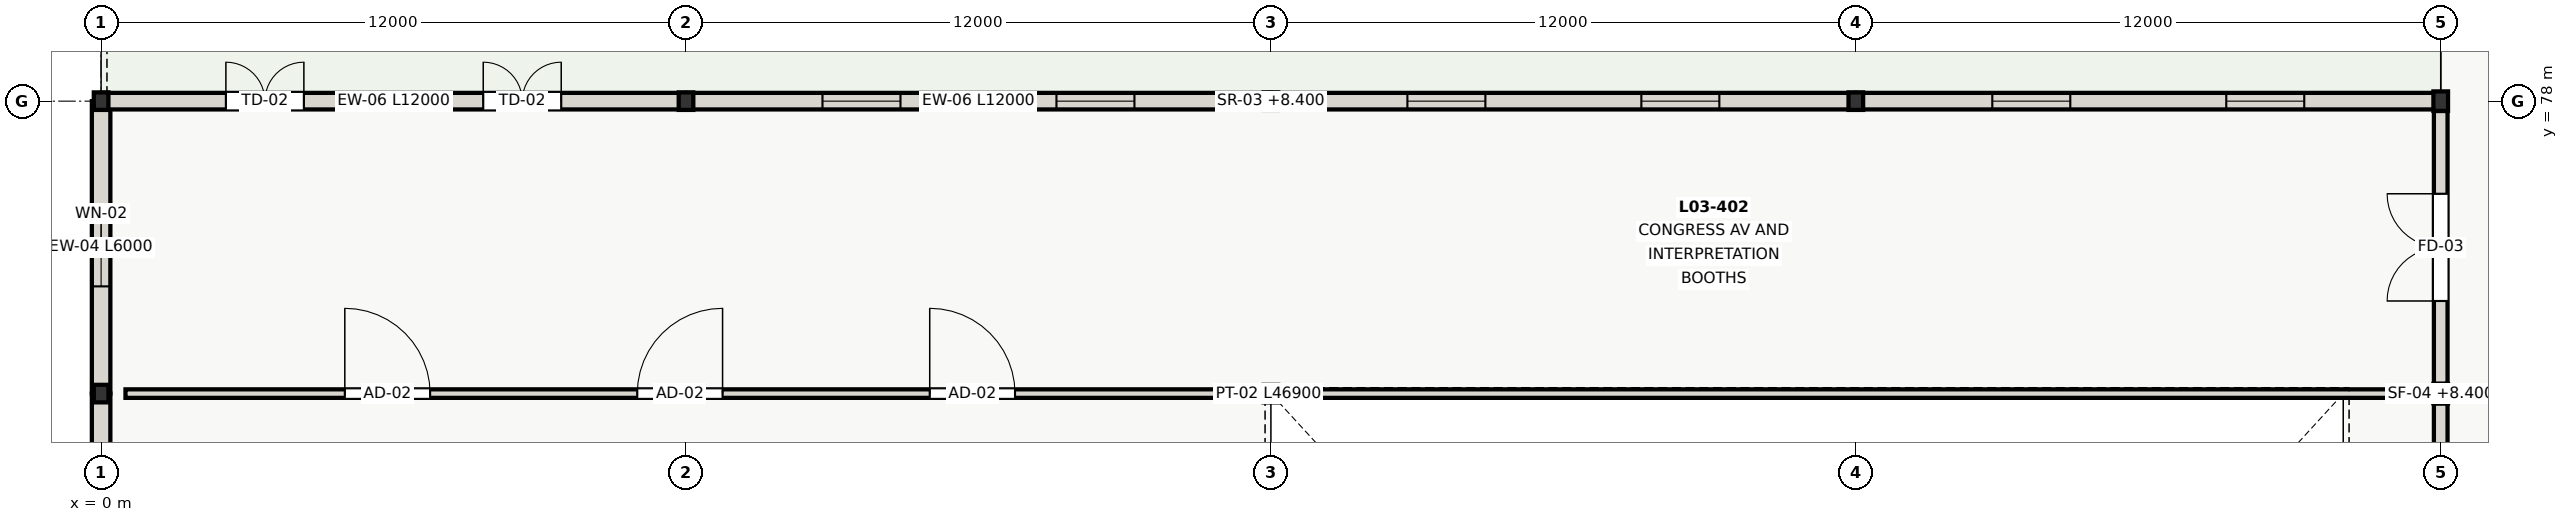
"""IFC4 building model, lengths in metres.
Left out: names, types, materials, properties, quantities, classifications, styles, units other than length and angle.
Written with IfcOpenShell. Run it as: python <this file> out.ifc"""

import sys

from ifc_helpers import new_model, si_unit, direction, frame, frame_2d, origin, origin_2d, place, context, subcontext, project, spatial, rectangle, i_section, extrude, element, fill, save


model = new_model("IFC4")
c1 = context("Model", 3, precision=1e-05, world=origin(), true_north=direction((0.0, 1.0)))
c2 = subcontext(c1, "Body", "Model", "MODEL_VIEW")
j1 = project(units=[si_unit("LENGTHUNIT", "METRE"), si_unit("PLANEANGLEUNIT", "RADIAN")], contexts=[c1])
p1 = place(None, origin())
s1 = spatial("IfcSite", under=j1, at=p1, CompositionType="ELEMENT")
p2 = place(p1, origin())
s2 = spatial("IfcBuilding", under=s1, at=p2, CompositionType="ELEMENT")
p3 = place(p2, frame((0.0, 0.0, 8.4)))
s3 = spatial("IfcBuildingStorey", under=s2, at=p3, CompositionType="ELEMENT", Elevation=8.4)
for number, where, z_axis, x_axis in (
    (1, (0.0, 72.0, 0.0), (0.0, 0.0, 1.0), (1.0, 0.0, 0.0)),
    (2, (24.0, 72.0, 0.0), (0.0, 0.0, 1.0), (1.0, 0.0, 0.0)),
):
    element("IfcColumn", number, at=place(p3, frame(where, z_axis=z_axis, x_axis=x_axis)), inside=s3, PredefinedType="COLUMN", context=c2, shape_type="SweptSolid", body=[
        extrude(i_section(OverallWidth=0.3, OverallDepth=0.36, WebThickness=0.012, FlangeThickness=0.022, at=origin_2d()), origin(), (0.0, 0.0, 1.0), 4.2),
    ])
p4 = place(p3, frame((48.0, 72.0, 0.0), z_axis=(0.0, 0.0, 1.0), x_axis=(1.0, 0.0, 0.0)))
e3 = element("IfcColumn", 3, at=p4, inside=s3, PredefinedType="COLUMN", context=c2, shape_type="SweptSolid", body=[
    extrude(i_section(OverallWidth=0.3, OverallDepth=0.4, WebThickness=0.013, FlangeThickness=0.024, at=origin_2d()), origin(), (0.0, 0.0, 1.0), 4.2),
])
for number, where, z_axis, x_axis in (
    (4, (0.0, 78.0, 0.0), (0.0, 0.0, 1.0), (1.0, 0.0, 0.0)),
    (5, (12.0, 78.0, 0.0), (0.0, 0.0, 1.0), (1.0, 0.0, 0.0)),
    (6, (24.0, 78.0, 0.0), (0.0, 0.0, 1.0), (1.0, 0.0, 0.0)),
    (7, (36.0, 78.0, 0.0), (0.0, 0.0, 1.0), (1.0, 0.0, 0.0)),
):
    element("IfcColumn", number, at=place(p3, frame(where, z_axis=z_axis, x_axis=x_axis)), inside=s3, PredefinedType="COLUMN", context=c2, shape_type="SweptSolid", body=[
        extrude(i_section(OverallWidth=0.3, OverallDepth=0.36, WebThickness=0.012, FlangeThickness=0.022, at=origin_2d()), origin(), (0.0, 0.0, 1.0), 4.2),
    ])
p5 = place(p3, frame((48.0, 78.0, 0.0), z_axis=(0.0, 0.0, 1.0), x_axis=(1.0, 0.0, 0.0)))
e8 = element("IfcColumn", 8, at=p5, inside=s3, PredefinedType="COLUMN", context=c2, shape_type="SweptSolid", body=[
    extrude(i_section(OverallWidth=0.3, OverallDepth=0.4, WebThickness=0.013, FlangeThickness=0.024, at=origin_2d()), origin(), (0.0, 0.0, 1.0), 4.2),
])
p6 = place(p3, frame((0.0, 67.6, 0.0), z_axis=(0.0, 0.0, 1.0), x_axis=(0.0, 1.0, 0.0)))
e9 = element("IfcWall", 9, at=p6, inside=s3, PredefinedType="SOLIDWALL", context=c2, shape_type="SweptSolid", body=[
    extrude(rectangle(XDim=4.4, YDim=0.38, at=frame_2d((2.2, 0.0))), origin(), (0.0, 0.0, 1.0), 4.2),
])
p7 = place(p6, frame((1.4, 0.0, 0.9)))
e10 = element("IfcOpeningElement", 10, at=p7, cuts=e9, PredefinedType="OPENING", context=c2, shape_type="SweptSolid", body=[
    extrude(rectangle(XDim=1.6, YDim=2.0, at=frame_2d((0.8, 1.0))), frame((0.0, 0.2, 0.0), z_axis=(0.0, -1.0, 0.0), x_axis=(1.0, 0.0, 0.0)), (0.0, 0.0, 1.0), 0.4),
])
p8 = place(p3, frame((0.0, 72.0, 0.0), z_axis=(0.0, 0.0, 1.0), x_axis=(0.0, 1.0, 0.0)))
e11 = element("IfcWall", 11, at=p8, inside=s3, PredefinedType="SOLIDWALL", context=c2, shape_type="SweptSolid", body=[
    extrude(rectangle(XDim=6.0, YDim=0.38, at=frame_2d((3.0, 0.0))), origin(), (0.0, 0.0, 1.0), 4.2),
])
p9 = place(p8, frame((2.2, 0.0, 0.9)))
e12 = element("IfcOpeningElement", 12, at=p9, cuts=e11, PredefinedType="OPENING", context=c2, shape_type="SweptSolid", body=[
    extrude(rectangle(XDim=1.6, YDim=2.0, at=frame_2d((0.8, 1.0))), frame((0.0, 0.2, 0.0), z_axis=(0.0, -1.0, 0.0), x_axis=(1.0, 0.0, 0.0)), (0.0, 0.0, 1.0), 0.4),
])
p10 = place(p3, frame((0.0, 78.0, 0.0), z_axis=(0.0, 0.0, 1.0), x_axis=(1.0, 0.0, 0.0)))
e13 = element("IfcWall", 13, at=p10, inside=s3, PredefinedType="SOLIDWALL", context=c2, shape_type="SweptSolid", body=[
    extrude(rectangle(XDim=12.0, YDim=0.34, at=frame_2d((6.0, 0.0))), origin(), (0.0, 0.0, 1.0), 4.2),
])
p11 = place(p10, frame((2.56, 0.0, 0.0)))
e14 = element("IfcOpeningElement", 14, at=p11, cuts=e13, PredefinedType="OPENING", context=c2, shape_type="SweptSolid", body=[
    extrude(rectangle(XDim=1.6, YDim=2.15, at=frame_2d((0.8, 1.075))), frame((0.0, 0.18, 0.0), z_axis=(0.0, -1.0, 0.0), x_axis=(1.0, 0.0, 0.0)), (0.0, 0.0, 1.0), 0.36),
])
p12 = place(p10, frame((7.84, 0.0, 0.0)))
e15 = element("IfcOpeningElement", 15, at=p12, cuts=e13, PredefinedType="OPENING", context=c2, shape_type="SweptSolid", body=[
    extrude(rectangle(XDim=1.6, YDim=2.15, at=frame_2d((0.8, 1.075))), frame((0.0, 0.18, 0.0), z_axis=(0.0, -1.0, 0.0), x_axis=(1.0, 0.0, 0.0)), (0.0, 0.0, 1.0), 0.36),
])
p13 = place(p3, frame((12.0, 78.0, 0.0), z_axis=(0.0, 0.0, 1.0), x_axis=(1.0, 0.0, 0.0)))
e16 = element("IfcWall", 16, at=p13, inside=s3, PredefinedType="SOLIDWALL", context=c2, shape_type="SweptSolid", body=[
    extrude(rectangle(XDim=12.0, YDim=0.34, at=frame_2d((6.0, 0.0))), origin(), (0.0, 0.0, 1.0), 4.2),
])
p14 = place(p13, frame((2.8, 0.0, 0.9)))
e17 = element("IfcOpeningElement", 17, at=p14, cuts=e16, PredefinedType="OPENING", context=c2, shape_type="SweptSolid", body=[
    extrude(rectangle(XDim=1.6, YDim=2.0, at=frame_2d((0.8, 1.0))), frame((0.0, 0.18, 0.0), z_axis=(0.0, -1.0, 0.0), x_axis=(1.0, 0.0, 0.0)), (0.0, 0.0, 1.0), 0.36),
])
p15 = place(p13, frame((7.6, 0.0, 0.9)))
e18 = element("IfcOpeningElement", 18, at=p15, cuts=e16, PredefinedType="OPENING", context=c2, shape_type="SweptSolid", body=[
    extrude(rectangle(XDim=1.6, YDim=2.0, at=frame_2d((0.8, 1.0))), frame((0.0, 0.18, 0.0), z_axis=(0.0, -1.0, 0.0), x_axis=(1.0, 0.0, 0.0)), (0.0, 0.0, 1.0), 0.36),
])
p16 = place(p3, frame((24.0, 78.0, 0.0), z_axis=(0.0, 0.0, 1.0), x_axis=(1.0, 0.0, 0.0)))
e19 = element("IfcWall", 19, at=p16, inside=s3, PredefinedType="SOLIDWALL", context=c2, shape_type="SweptSolid", body=[
    extrude(rectangle(XDim=12.0, YDim=0.34, at=frame_2d((6.0, 0.0))), origin(), (0.0, 0.0, 1.0), 4.2),
])
p17 = place(p16, frame((2.8, 0.0, 0.9)))
e20 = element("IfcOpeningElement", 20, at=p17, cuts=e19, PredefinedType="OPENING", context=c2, shape_type="SweptSolid", body=[
    extrude(rectangle(XDim=1.6, YDim=2.0, at=frame_2d((0.8, 1.0))), frame((0.0, 0.18, 0.0), z_axis=(0.0, -1.0, 0.0), x_axis=(1.0, 0.0, 0.0)), (0.0, 0.0, 1.0), 0.36),
])
p18 = place(p16, frame((7.6, 0.0, 0.9)))
e21 = element("IfcOpeningElement", 21, at=p18, cuts=e19, PredefinedType="OPENING", context=c2, shape_type="SweptSolid", body=[
    extrude(rectangle(XDim=1.6, YDim=2.0, at=frame_2d((0.8, 1.0))), frame((0.0, 0.18, 0.0), z_axis=(0.0, -1.0, 0.0), x_axis=(1.0, 0.0, 0.0)), (0.0, 0.0, 1.0), 0.36),
])
p19 = place(p3, frame((36.0, 78.0, 0.0), z_axis=(0.0, 0.0, 1.0), x_axis=(1.0, 0.0, 0.0)))
e22 = element("IfcWall", 22, at=p19, inside=s3, PredefinedType="SOLIDWALL", context=c2, shape_type="SweptSolid", body=[
    extrude(rectangle(XDim=12.0, YDim=0.34, at=frame_2d((6.0, 0.0))), origin(), (0.0, 0.0, 1.0), 4.2),
])
p20 = place(p19, frame((2.8, 0.0, 0.9)))
e23 = element("IfcOpeningElement", 23, at=p20, cuts=e22, PredefinedType="OPENING", context=c2, shape_type="SweptSolid", body=[
    extrude(rectangle(XDim=1.6, YDim=2.0, at=frame_2d((0.8, 1.0))), frame((0.0, 0.18, 0.0), z_axis=(0.0, -1.0, 0.0), x_axis=(1.0, 0.0, 0.0)), (0.0, 0.0, 1.0), 0.36),
])
p21 = place(p19, frame((7.6, 0.0, 0.9)))
e24 = element("IfcOpeningElement", 24, at=p21, cuts=e22, PredefinedType="OPENING", context=c2, shape_type="SweptSolid", body=[
    extrude(rectangle(XDim=1.6, YDim=2.0, at=frame_2d((0.8, 1.0))), frame((0.0, 0.18, 0.0), z_axis=(0.0, -1.0, 0.0), x_axis=(1.0, 0.0, 0.0)), (0.0, 0.0, 1.0), 0.36),
])
p22 = place(p3, frame((48.0, 66.202, 0.0), z_axis=(0.0, 0.0, 1.0), x_axis=(0.0, 1.0, 0.0)))
e25 = element("IfcWall", 25, at=p22, inside=s3, PredefinedType="SHEAR", context=c2, shape_type="SweptSolid", body=[
    extrude(rectangle(XDim=5.596, YDim=0.28, at=frame_2d((2.798, 0.0))), origin(), (0.0, 0.0, 1.0), 3.8),
])
p23 = place(p3, frame((48.0, 72.202, 0.0), z_axis=(0.0, 0.0, 1.0), x_axis=(0.0, 1.0, 0.0)))
e26 = element("IfcWall", 26, at=p23, inside=s3, PredefinedType="SHEAR", context=c2, shape_type="SweptSolid", body=[
    extrude(rectangle(XDim=5.596, YDim=0.28, at=frame_2d((2.798, 0.0))), origin(), (0.0, 0.0, 1.0), 3.8),
])
p24 = place(p23, frame((1.698, 0.0, 0.0)))
e27 = element("IfcOpeningElement", 27, at=p24, cuts=e26, PredefinedType="OPENING", context=c2, shape_type="SweptSolid", body=[
    extrude(rectangle(XDim=2.2, YDim=2.3, at=frame_2d((1.1, 1.15))), frame((0.0, 0.15, 0.0), z_axis=(0.0, -1.0, 0.0), x_axis=(1.0, 0.0, 0.0)), (0.0, 0.0, 1.0), 0.3),
])
p25 = place(p3, frame((0.5, 72.0, 0.0), z_axis=(0.0, 0.0, 1.0), x_axis=(1.0, 0.0, 0.0)))
e28 = element("IfcWall", 28, at=p25, inside=s3, PredefinedType="PARTITIONING", context=c2, shape_type="SweptSolid", body=[
    extrude(rectangle(XDim=46.9, YDim=0.175, at=frame_2d((23.45, 0.0))), origin(), (0.0, 0.0, 1.0), 3.76),
])
p26 = place(p25, frame((4.5, 0.0, 0.0)))
e29 = element("IfcOpeningElement", 29, at=p26, cuts=e28, PredefinedType="OPENING", context=c2, shape_type="SweptSolid", body=[
    extrude(rectangle(XDim=1.75, YDim=2.2, at=frame_2d((0.875, 1.1))), frame((0.0, 0.097, 0.0), z_axis=(0.0, -1.0, 0.0), x_axis=(1.0, 0.0, 0.0)), (0.0, 0.0, 1.0), 0.195),
])
p27 = place(p25, frame((10.5, 0.0, 0.0)))
e30 = element("IfcOpeningElement", 30, at=p27, cuts=e28, PredefinedType="OPENING", context=c2, shape_type="SweptSolid", body=[
    extrude(rectangle(XDim=1.75, YDim=2.2, at=frame_2d((0.875, 1.1))), frame((0.0, 0.097, 0.0), z_axis=(0.0, -1.0, 0.0), x_axis=(1.0, 0.0, 0.0)), (0.0, 0.0, 1.0), 0.195),
])
p28 = place(p25, frame((16.5, 0.0, 0.0)))
e31 = element("IfcOpeningElement", 31, at=p28, cuts=e28, PredefinedType="OPENING", context=c2, shape_type="SweptSolid", body=[
    extrude(rectangle(XDim=1.75, YDim=2.2, at=frame_2d((0.875, 1.1))), frame((0.0, 0.097, 0.0), z_axis=(0.0, -1.0, 0.0), x_axis=(1.0, 0.0, 0.0)), (0.0, 0.0, 1.0), 0.195),
])
p29 = place(p9, origin())
e32 = element("IfcWindow", 32, at=p29, inside=s3, PartitioningType="SINGLE_PANEL", PredefinedType="WINDOW", context=c2, shape_type="SweptSolid", body=[
    extrude(rectangle(XDim=1.6, YDim=2.0, at=frame_2d((0.8, 1.0))), frame((0.0, 0.03, 0.0), z_axis=(0.0, -1.0, 0.0), x_axis=(1.0, 0.0, 0.0)), (0.0, 0.0, 1.0), 0.06),
])
fill(e12, e32)
p30 = place(p11, origin())
e33 = element("IfcDoor", 33, at=p30, inside=s3, OperationType="DOUBLE_DOOR_SINGLE_SWING", PredefinedType="DOOR", context=c2, shape_type="SweptSolid", body=[
    extrude(rectangle(XDim=1.6, YDim=2.15, at=frame_2d((0.8, 1.075))), frame((0.0, 0.025, 0.0), z_axis=(0.0, -1.0, 0.0), x_axis=(1.0, 0.0, 0.0)), (0.0, 0.0, 1.0), 0.05),
])
fill(e14, e33)
p31 = place(p12, origin())
e34 = element("IfcDoor", 34, at=p31, inside=s3, OperationType="DOUBLE_DOOR_SINGLE_SWING", PredefinedType="DOOR", context=c2, shape_type="SweptSolid", body=[
    extrude(rectangle(XDim=1.6, YDim=2.15, at=frame_2d((0.8, 1.075))), frame((0.0, 0.025, 0.0), z_axis=(0.0, -1.0, 0.0), x_axis=(1.0, 0.0, 0.0)), (0.0, 0.0, 1.0), 0.05),
])
fill(e15, e34)
p32 = place(p14, origin())
e35 = element("IfcWindow", 35, at=p32, inside=s3, PartitioningType="SINGLE_PANEL", PredefinedType="WINDOW", context=c2, shape_type="SweptSolid", body=[
    extrude(rectangle(XDim=1.6, YDim=2.0, at=frame_2d((0.8, 1.0))), frame((0.0, 0.03, 0.0), z_axis=(0.0, -1.0, 0.0), x_axis=(1.0, 0.0, 0.0)), (0.0, 0.0, 1.0), 0.06),
])
fill(e17, e35)
p33 = place(p15, origin())
e36 = element("IfcWindow", 36, at=p33, inside=s3, PartitioningType="SINGLE_PANEL", PredefinedType="WINDOW", context=c2, shape_type="SweptSolid", body=[
    extrude(rectangle(XDim=1.6, YDim=2.0, at=frame_2d((0.8, 1.0))), frame((0.0, 0.03, 0.0), z_axis=(0.0, -1.0, 0.0), x_axis=(1.0, 0.0, 0.0)), (0.0, 0.0, 1.0), 0.06),
])
fill(e18, e36)
p34 = place(p17, origin())
e37 = element("IfcWindow", 37, at=p34, inside=s3, PartitioningType="SINGLE_PANEL", PredefinedType="WINDOW", context=c2, shape_type="SweptSolid", body=[
    extrude(rectangle(XDim=1.6, YDim=2.0, at=frame_2d((0.8, 1.0))), frame((0.0, 0.03, 0.0), z_axis=(0.0, -1.0, 0.0), x_axis=(1.0, 0.0, 0.0)), (0.0, 0.0, 1.0), 0.06),
])
fill(e20, e37)
p35 = place(p18, origin())
e38 = element("IfcWindow", 38, at=p35, inside=s3, PartitioningType="SINGLE_PANEL", PredefinedType="WINDOW", context=c2, shape_type="SweptSolid", body=[
    extrude(rectangle(XDim=1.6, YDim=2.0, at=frame_2d((0.8, 1.0))), frame((0.0, 0.03, 0.0), z_axis=(0.0, -1.0, 0.0), x_axis=(1.0, 0.0, 0.0)), (0.0, 0.0, 1.0), 0.06),
])
fill(e21, e38)
p36 = place(p20, origin())
e39 = element("IfcWindow", 39, at=p36, inside=s3, PartitioningType="SINGLE_PANEL", PredefinedType="WINDOW", context=c2, shape_type="SweptSolid", body=[
    extrude(rectangle(XDim=1.6, YDim=2.0, at=frame_2d((0.8, 1.0))), frame((0.0, 0.03, 0.0), z_axis=(0.0, -1.0, 0.0), x_axis=(1.0, 0.0, 0.0)), (0.0, 0.0, 1.0), 0.06),
])
fill(e23, e39)
p37 = place(p21, origin())
e40 = element("IfcWindow", 40, at=p37, inside=s3, PartitioningType="SINGLE_PANEL", PredefinedType="WINDOW", context=c2, shape_type="SweptSolid", body=[
    extrude(rectangle(XDim=1.6, YDim=2.0, at=frame_2d((0.8, 1.0))), frame((0.0, 0.03, 0.0), z_axis=(0.0, -1.0, 0.0), x_axis=(1.0, 0.0, 0.0)), (0.0, 0.0, 1.0), 0.06),
])
fill(e24, e40)
p38 = place(p24, origin())
e41 = element("IfcDoor", 41, at=p38, inside=s3, OperationType="DOUBLE_DOOR_SINGLE_SWING", PredefinedType="DOOR", context=c2, shape_type="SweptSolid", body=[
    extrude(rectangle(XDim=2.2, YDim=2.3, at=frame_2d((1.1, 1.15))), frame((0.0, 0.025, 0.0), z_axis=(0.0, -1.0, 0.0), x_axis=(1.0, 0.0, 0.0)), (0.0, 0.0, 1.0), 0.05),
])
fill(e27, e41)
p39 = place(p26, origin())
e42 = element("IfcDoor", 42, at=p39, inside=s3, OperationType="SINGLE_SWING_LEFT", PredefinedType="DOOR", context=c2, shape_type="SweptSolid", body=[
    extrude(rectangle(XDim=1.75, YDim=2.2, at=frame_2d((0.875, 1.1))), frame((0.0, 0.025, 0.0), z_axis=(0.0, -1.0, 0.0), x_axis=(1.0, 0.0, 0.0)), (0.0, 0.0, 1.0), 0.05),
])
fill(e29, e42)
p40 = place(p27, origin())
e43 = element("IfcDoor", 43, at=p40, inside=s3, OperationType="SINGLE_SWING_RIGHT", PredefinedType="DOOR", context=c2, shape_type="SweptSolid", body=[
    extrude(rectangle(XDim=1.75, YDim=2.2, at=frame_2d((0.875, 1.1))), frame((0.0, 0.025, 0.0), z_axis=(0.0, -1.0, 0.0), x_axis=(1.0, 0.0, 0.0)), (0.0, 0.0, 1.0), 0.05),
])
fill(e30, e43)
p41 = place(p28, origin())
e44 = element("IfcDoor", 44, at=p41, inside=s3, OperationType="SINGLE_SWING_LEFT", PredefinedType="DOOR", context=c2, shape_type="SweptSolid", body=[
    extrude(rectangle(XDim=1.75, YDim=2.2, at=frame_2d((0.875, 1.1))), frame((0.0, 0.025, 0.0), z_axis=(0.0, -1.0, 0.0), x_axis=(1.0, 0.0, 0.0)), (0.0, 0.0, 1.0), 0.05),
])
fill(e31, e44)
save(model, sys.argv[1])
